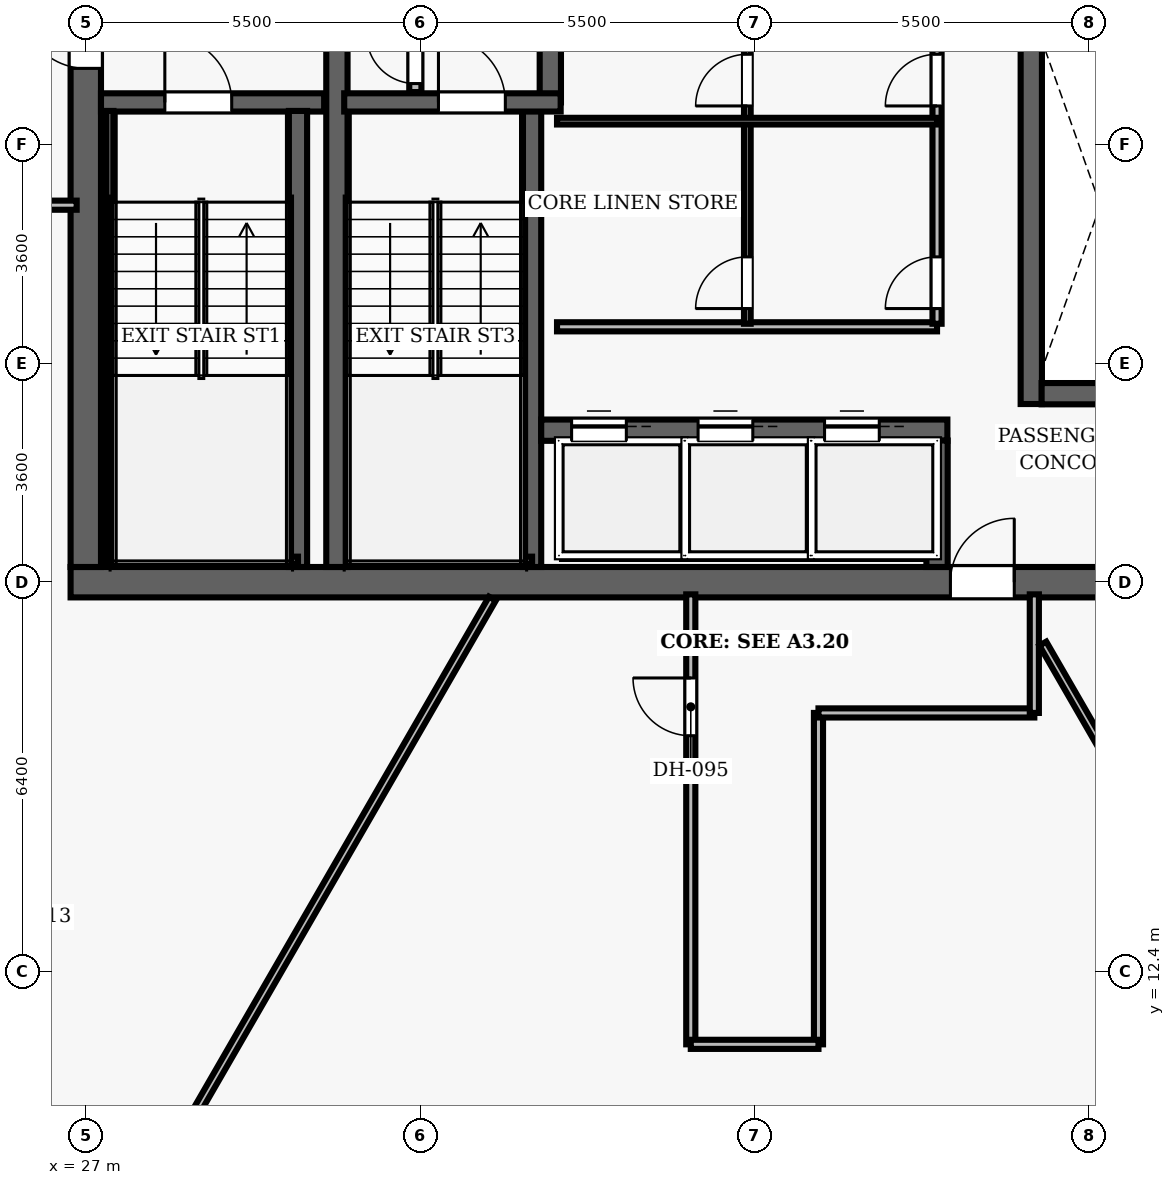
"""IFC4 building model, lengths in metres.
Left out: names, types, materials, properties, quantities, classifications, styles, units other than length and angle.
Written with IfcOpenShell. Run it as: python <this file> out.ifc"""

import sys

from ifc_helpers import new_model, si_unit, direction, frame, frame_2d, origin, place, context, subcontext, project, spatial, rectangle, extrude, element, fill, save


model = new_model("IFC4")
c1 = context("Model", 3, precision=1e-05, world=origin(), true_north=direction((0.0, 1.0)))
c2 = subcontext(c1, "Body", "Model", "MODEL_VIEW")
j1 = project(units=[si_unit("LENGTHUNIT", "METRE"), si_unit("PLANEANGLEUNIT", "RADIAN")], contexts=[c1])
p1 = place(None, origin())
s1 = spatial("IfcSite", under=j1, at=p1, CompositionType="ELEMENT")
p2 = place(p1, origin())
s2 = spatial("IfcBuilding", under=s1, at=p2, CompositionType="ELEMENT")
p3 = place(p2, frame((0.0, 0.0, 178.9)))
s3 = spatial("IfcBuildingStorey", under=s2, at=p3, CompositionType="ELEMENT", Elevation=178.9)
p4 = place(p3, frame((26.75, 18.8, 0.0), z_axis=(0.0, 0.0, 1.0), x_axis=(1.0, 0.0, 0.0)))
e1 = element("IfcWall", 1, at=p4, inside=s3, PredefinedType="SHEAR", context=c2, shape_type="SweptSolid", body=[
    extrude(rectangle(XDim=22.5, YDim=0.5, at=frame_2d((11.25, 0.0))), origin(), (0.0, 0.0, 1.0), 3.85),
])
p5 = place(p4, frame((14.47, 0.0, 0.0)))
e2 = element("IfcOpeningElement", 2, at=p5, cuts=e1, PredefinedType="OPENING", context=c2, shape_type="SweptSolid", body=[
    extrude(rectangle(XDim=1.05, YDim=2.15, at=frame_2d((0.525, 1.075))), frame((0.0, 0.26, 0.0), z_axis=(0.0, -1.0, 0.0), x_axis=(1.0, 0.0, 0.0)), (0.0, 0.0, 1.0), 0.52),
])
p6 = place(p3, frame((27.0, 19.05, 0.0), z_axis=(0.0, 0.0, 1.0), x_axis=(0.0, 1.0, 0.0)))
e3 = element("IfcWall", 3, at=p6, inside=s3, PredefinedType="SHEAR", context=c2, shape_type="SweptSolid", body=[
    extrude(rectangle(XDim=13.9, YDim=0.5, at=frame_2d((6.95, 0.0))), origin(), (0.0, 0.0, 1.0), 3.85),
])
p7 = place(p6, frame((8.2, 0.0, 0.0)))
e4 = element("IfcOpeningElement", 4, at=p7, cuts=e3, PredefinedType="OPENING", context=c2, shape_type="SweptSolid", body=[
    extrude(rectangle(XDim=1.05, YDim=2.15, at=frame_2d((0.525, 1.075))), frame((0.0, 0.26, 0.0), z_axis=(0.0, -1.0, 0.0), x_axis=(1.0, 0.0, 0.0)), (0.0, 0.0, 1.0), 0.52),
])
p8 = place(p3, frame((31.13, 19.05, 0.0), z_axis=(0.0, 0.0, 1.0), x_axis=(0.0, 1.0, 0.0)))
e5 = element("IfcWall", 5, at=p8, inside=s3, PredefinedType="SHEAR", context=c2, shape_type="SweptSolid", body=[
    extrude(rectangle(XDim=13.9, YDim=0.35, at=frame_2d((6.95, 0.0))), origin(), (0.0, 0.0, 1.0), 3.85),
])
p9 = place(p3, frame((27.25, 26.69, 0.0), z_axis=(0.0, 0.0, 1.0), x_axis=(1.0, 0.0, 0.0)))
e6 = element("IfcWall", 6, at=p9, inside=s3, PredefinedType="SHEAR", context=c2, shape_type="SweptSolid", body=[
    extrude(rectangle(XDim=3.67, YDim=0.3, at=frame_2d((1.835, 0.0))), origin(), (0.0, 0.0, 1.0), 3.85),
])
p10 = place(p9, frame((1.05, 0.0, 0.0)))
e7 = element("IfcOpeningElement", 7, at=p10, cuts=e6, PredefinedType="OPENING", context=c2, shape_type="SweptSolid", body=[
    extrude(rectangle(XDim=1.1, YDim=2.15, at=frame_2d((0.55, 1.075))), frame((0.0, 0.16, 0.0), z_axis=(0.0, -1.0, 0.0), x_axis=(1.0, 0.0, 0.0)), (0.0, 0.0, 1.0), 0.32),
])
p11 = place(p3, frame((30.49, 19.05, 0.0), z_axis=(0.0, 0.0, 1.0), x_axis=(0.0, 1.0, 0.0)))
e8 = element("IfcWall", 8, at=p11, inside=s3, PredefinedType="SHEAR", context=c2, shape_type="SweptSolid", body=[
    extrude(rectangle(XDim=7.5, YDim=0.3, at=frame_2d((3.75, 0.0))), origin(), (0.0, 0.0, 1.0), 3.85),
])
p12 = place(p3, frame((27.395, 19.1, 0.0), z_axis=(0.0, 0.0, 1.0), x_axis=(0.0, 1.0, 0.0)))
e9 = element("IfcWall", 9, at=p12, inside=s3, PredefinedType="SHEAR", context=c2, shape_type="SweptSolid", body=[
    extrude(rectangle(XDim=7.45, YDim=0.12, at=frame_2d((3.725, 0.0))), origin(), (0.0, 0.0, 1.0), 3.85),
])
p13 = place(p3, frame((27.395, 19.16, 0.0), z_axis=(0.0, 0.0, 1.0), x_axis=(1.0, 0.0, 0.0)))
e10 = element("IfcWall", 10, at=p13, inside=s3, PredefinedType="SHEAR", context=c2, shape_type="SweptSolid", body=[
    extrude(rectangle(XDim=3.095, YDim=0.12, at=frame_2d((1.547, 0.0))), origin(), (0.0, 0.0, 1.0), 3.85),
])
p14 = place(p3, frame((34.34, 19.05, 0.0), z_axis=(0.0, 0.0, 1.0), x_axis=(0.0, 1.0, 0.0)))
e11 = element("IfcWall", 11, at=p14, inside=s3, PredefinedType="SHEAR", context=c2, shape_type="SweptSolid", body=[
    extrude(rectangle(XDim=7.5, YDim=0.3, at=frame_2d((3.75, 0.0))), origin(), (0.0, 0.0, 1.0), 3.85),
])
p15 = place(p3, frame((34.64, 26.69, 0.0), z_axis=(0.0, 0.0, 1.0), x_axis=(0.0, 1.0, 0.0)))
e12 = element("IfcWall", 12, at=p15, inside=s3, PredefinedType="SHEAR", context=c2, shape_type="SweptSolid", body=[
    extrude(rectangle(XDim=6.26, YDim=0.35, at=frame_2d((3.13, 0.0))), origin(), (0.0, 0.0, 1.0), 3.85),
])
p16 = place(p3, frame((31.25, 26.69, 0.0), z_axis=(0.0, 0.0, 1.0), x_axis=(1.0, 0.0, 0.0)))
e13 = element("IfcWall", 13, at=p16, inside=s3, PredefinedType="SHEAR", context=c2, shape_type="SweptSolid", body=[
    extrude(rectangle(XDim=3.56, YDim=0.3, at=frame_2d((1.78, 0.0))), origin(), (0.0, 0.0, 1.0), 3.85),
])
p17 = place(p16, frame((1.55, 0.0, 0.0)))
e14 = element("IfcOpeningElement", 14, at=p17, cuts=e13, PredefinedType="OPENING", context=c2, shape_type="SweptSolid", body=[
    extrude(rectangle(XDim=1.1, YDim=2.15, at=frame_2d((0.55, 1.075))), frame((0.0, 0.16, 0.0), z_axis=(0.0, -1.0, 0.0), x_axis=(1.0, 0.0, 0.0)), (0.0, 0.0, 1.0), 0.32),
])
p18 = place(p3, frame((31.3, 19.16, 0.0), z_axis=(0.0, 0.0, 1.0), x_axis=(1.0, 0.0, 0.0)))
e15 = element("IfcWall", 15, at=p18, inside=s3, PredefinedType="SHEAR", context=c2, shape_type="SweptSolid", body=[
    extrude(rectangle(XDim=3.04, YDim=0.12, at=frame_2d((1.52, 0.0))), origin(), (0.0, 0.0, 1.0), 3.85),
])
p19 = place(p3, frame((32.42, 26.86, 0.0), z_axis=(0.0, 0.0, 1.0), x_axis=(0.0, 1.0, 0.0)))
e16 = element("IfcWall", 16, at=p19, inside=s3, PredefinedType="PARTITIONING", context=c2, shape_type="SweptSolid", body=[
    extrude(rectangle(XDim=2.04, YDim=0.2, at=frame_2d((1.02, 0.0))), origin(), (0.0, 0.0, 1.0), 3.035),
])
p20 = place(p19, frame((0.14, 0.0, 0.0)))
e17 = element("IfcOpeningElement", 17, at=p20, cuts=e16, PredefinedType="OPENING", context=c2, shape_type="SweptSolid", body=[
    extrude(rectangle(XDim=0.8, YDim=2.05, at=frame_2d((0.4, 1.025))), frame((0.0, 0.11, 0.0), z_axis=(0.0, -1.0, 0.0), x_axis=(1.0, 0.0, 0.0)), (0.0, 0.0, 1.0), 0.22),
])
p21 = place(p3, frame((42.55, 21.73, 0.0), z_axis=(0.0, 0.0, 1.0), x_axis=(0.0, 1.0, 0.0)))
e18 = element("IfcWall", 18, at=p21, inside=s3, PredefinedType="SHEAR", context=c2, shape_type="SweptSolid", body=[
    extrude(rectangle(XDim=6.54, YDim=0.35, at=frame_2d((3.27, 0.0))), origin(), (0.0, 0.0, 1.0), 3.035),
])
p22 = place(p3, frame((42.72, 21.9, 0.0), z_axis=(0.0, 0.0, 1.0), x_axis=(1.0, 0.0, 0.0)))
e19 = element("IfcWall", 19, at=p22, inside=s3, PredefinedType="SHEAR", context=c2, shape_type="SweptSolid", body=[
    extrude(rectangle(XDim=2.03, YDim=0.35, at=frame_2d((1.015, 0.0))), origin(), (0.0, 0.0, 1.0), 3.035),
])
p23 = place(p3, frame((34.49, 21.3, 0.0), z_axis=(0.0, 0.0, 1.0), x_axis=(1.0, 0.0, 0.0)))
e20 = element("IfcWall", 20, at=p23, inside=s3, PredefinedType="SHEAR", context=c2, shape_type="SweptSolid", body=[
    extrude(rectangle(XDim=6.68, YDim=0.35, at=frame_2d((3.34, 0.0))), origin(), (0.0, 0.0, 1.0), 3.035),
])
p24 = place(p23, frame((0.5, 0.0, 0.0)))
e21 = element("IfcOpeningElement", 21, at=p24, cuts=e20, PredefinedType="OPENING", context=c2, shape_type="SweptSolid", body=[
    extrude(rectangle(XDim=0.9, YDim=2.15, at=frame_2d((0.45, 1.075))), frame((0.0, 0.185, 0.0), z_axis=(0.0, -1.0, 0.0), x_axis=(1.0, 0.0, 0.0)), (0.0, 0.0, 1.0), 0.37),
])
p25 = place(p23, frame((2.58, 0.0, 0.0)))
e22 = element("IfcOpeningElement", 22, at=p25, cuts=e20, PredefinedType="OPENING", context=c2, shape_type="SweptSolid", body=[
    extrude(rectangle(XDim=0.9, YDim=2.15, at=frame_2d((0.45, 1.075))), frame((0.0, 0.185, 0.0), z_axis=(0.0, -1.0, 0.0), x_axis=(1.0, 0.0, 0.0)), (0.0, 0.0, 1.0), 0.37),
])
p26 = place(p23, frame((4.66, 0.0, 0.0)))
e23 = element("IfcOpeningElement", 23, at=p26, cuts=e20, PredefinedType="OPENING", context=c2, shape_type="SweptSolid", body=[
    extrude(rectangle(XDim=0.9, YDim=2.15, at=frame_2d((0.45, 1.075))), frame((0.0, 0.185, 0.0), z_axis=(0.0, -1.0, 0.0), x_axis=(1.0, 0.0, 0.0)), (0.0, 0.0, 1.0), 0.37),
])
p27 = place(p3, frame((41.0, 19.05, 0.0), z_axis=(0.0, 0.0, 1.0), x_axis=(0.0, 1.0, 0.0)))
e24 = element("IfcWall", 24, at=p27, inside=s3, PredefinedType="SHEAR", context=c2, shape_type="SweptSolid", body=[
    extrude(rectangle(XDim=2.08, YDim=0.35, at=frame_2d((1.04, 0.0))), origin(), (0.0, 0.0, 1.0), 3.035),
])
p28 = place(p3, frame((34.75, 23.0, 0.0), z_axis=(0.0, 0.0, 1.0), x_axis=(1.0, 0.0, 0.0)))
e25 = element("IfcWall", 25, at=p28, inside=s3, PredefinedType="PARTITIONING", context=c2, shape_type="SweptSolid", body=[
    extrude(rectangle(XDim=6.25, YDim=0.15, at=frame_2d((3.125, 0.0))), origin(), (0.0, 0.0, 1.0), 3.035),
])
p29 = place(p3, frame((41.0, 23.05, 0.0), z_axis=(0.0, 0.0, 1.0), x_axis=(0.0, 1.0, 0.0)))
e26 = element("IfcWall", 26, at=p29, inside=s3, PredefinedType="PARTITIONING", context=c2, shape_type="SweptSolid", body=[
    extrude(rectangle(XDim=9.8, YDim=0.15, at=frame_2d((4.9, 0.0))), origin(), (0.0, 0.0, 1.0), 3.035),
])
p30 = place(p29, frame((0.25, 0.0, 0.0)))
e27 = element("IfcOpeningElement", 27, at=p30, cuts=e26, PredefinedType="OPENING", context=c2, shape_type="SweptSolid", body=[
    extrude(rectangle(XDim=0.85, YDim=2.1, at=frame_2d((0.425, 1.05))), frame((0.0, 0.085, 0.0), z_axis=(0.0, -1.0, 0.0), x_axis=(1.0, 0.0, 0.0)), (0.0, 0.0, 1.0), 0.17),
])
p31 = place(p29, frame((3.582, 0.0, 0.0)))
e28 = element("IfcOpeningElement", 28, at=p31, cuts=e26, PredefinedType="OPENING", context=c2, shape_type="SweptSolid", body=[
    extrude(rectangle(XDim=0.85, YDim=2.1, at=frame_2d((0.425, 1.05))), frame((0.0, 0.085, 0.0), z_axis=(0.0, -1.0, 0.0), x_axis=(1.0, 0.0, 0.0)), (0.0, 0.0, 1.0), 0.17),
])
p32 = place(p29, frame((6.816, 0.0, 0.0)))
e29 = element("IfcOpeningElement", 29, at=p32, cuts=e26, PredefinedType="OPENING", context=c2, shape_type="SweptSolid", body=[
    extrude(rectangle(XDim=0.85, YDim=2.1, at=frame_2d((0.425, 1.05))), frame((0.0, 0.085, 0.0), z_axis=(0.0, -1.0, 0.0), x_axis=(1.0, 0.0, 0.0)), (0.0, 0.0, 1.0), 0.17),
])
p33 = place(p3, frame((37.88, 23.05, 0.0), z_axis=(0.0, 0.0, 1.0), x_axis=(0.0, 1.0, 0.0)))
e30 = element("IfcWall", 30, at=p33, inside=s3, PredefinedType="PARTITIONING", context=c2, shape_type="SweptSolid", body=[
    extrude(rectangle(XDim=9.8, YDim=0.11, at=frame_2d((4.9, 0.0))), origin(), (0.0, 0.0, 1.0), 3.035),
])
p34 = place(p33, frame((0.25, 0.0, 0.0)))
e31 = element("IfcOpeningElement", 31, at=p34, cuts=e30, PredefinedType="OPENING", context=c2, shape_type="SweptSolid", body=[
    extrude(rectangle(XDim=0.85, YDim=2.1, at=frame_2d((0.425, 1.05))), frame((0.0, 0.065, 0.0), z_axis=(0.0, -1.0, 0.0), x_axis=(1.0, 0.0, 0.0)), (0.0, 0.0, 1.0), 0.13),
])
p35 = place(p33, frame((3.582, 0.0, 0.0)))
e32 = element("IfcOpeningElement", 32, at=p35, cuts=e30, PredefinedType="OPENING", context=c2, shape_type="SweptSolid", body=[
    extrude(rectangle(XDim=0.85, YDim=2.1, at=frame_2d((0.425, 1.05))), frame((0.0, 0.065, 0.0), z_axis=(0.0, -1.0, 0.0), x_axis=(1.0, 0.0, 0.0)), (0.0, 0.0, 1.0), 0.13),
])
p36 = place(p33, frame((6.816, 0.0, 0.0)))
e33 = element("IfcOpeningElement", 33, at=p36, cuts=e30, PredefinedType="OPENING", context=c2, shape_type="SweptSolid", body=[
    extrude(rectangle(XDim=0.85, YDim=2.1, at=frame_2d((0.425, 1.05))), frame((0.0, 0.065, 0.0), z_axis=(0.0, -1.0, 0.0), x_axis=(1.0, 0.0, 0.0)), (0.0, 0.0, 1.0), 0.13),
])
p37 = place(p3, frame((34.75, 26.382, 0.0), z_axis=(0.0, 0.0, 1.0), x_axis=(1.0, 0.0, 0.0)))
e34 = element("IfcWall", 34, at=p37, inside=s3, PredefinedType="PARTITIONING", context=c2, shape_type="SweptSolid", body=[
    extrude(rectangle(XDim=6.25, YDim=0.11, at=frame_2d((3.125, 0.0))), origin(), (0.0, 0.0, 1.0), 3.035),
])
p38 = place(p3, frame((17.291, 25.0, 0.0), z_axis=(0.0, 0.0, 1.0), x_axis=(1.0, 0.0, 0.0)))
e35 = element("IfcWall", 35, at=p38, inside=s3, PredefinedType="PARTITIONING", context=c2, shape_type="SweptSolid", body=[
    extrude(rectangle(XDim=9.559, YDim=0.15, at=frame_2d((4.78, 0.0))), origin(), (0.0, 0.0, 1.0), 3.035),
])
p39 = place(p38, frame((6.419, 0.0, 0.0)))
e36 = element("IfcOpeningElement", 36, at=p39, cuts=e35, PredefinedType="OPENING", context=c2, shape_type="SweptSolid", body=[
    extrude(rectangle(XDim=1.5, YDim=2.2, at=frame_2d((0.75, 1.1))), frame((0.0, 0.085, 0.0), z_axis=(0.0, -1.0, 0.0), x_axis=(1.0, 0.0, 0.0)), (0.0, 0.0, 1.0), 0.17),
])
p40 = place(p3, frame((36.95, 11.2, 0.0), z_axis=(0.0, 0.0, 1.0), x_axis=(0.0, 1.0, 0.0)))
e37 = element("IfcWall", 37, at=p40, inside=s3, PredefinedType="PARTITIONING", context=c2, shape_type="SweptSolid", body=[
    extrude(rectangle(XDim=7.4, YDim=0.15, at=frame_2d((3.7, 0.0))), origin(), (0.0, 0.0, 1.0), 3.035),
])
p41 = place(p40, frame((5.075, 0.0, 0.0)))
e38 = element("IfcOpeningElement", 38, at=p41, cuts=e37, PredefinedType="OPENING", context=c2, shape_type="SweptSolid", body=[
    extrude(rectangle(XDim=0.95, YDim=2.15, at=frame_2d((0.475, 1.075))), frame((0.0, 0.085, 0.0), z_axis=(0.0, -1.0, 0.0), x_axis=(1.0, 0.0, 0.0)), (0.0, 0.0, 1.0), 0.17),
])
p42 = place(p3, frame((39.05, 11.2, 0.0), z_axis=(0.0, 0.0, 1.0), x_axis=(0.0, 1.0, 0.0)))
e39 = element("IfcWall", 39, at=p42, inside=s3, PredefinedType="PARTITIONING", context=c2, shape_type="SweptSolid", body=[
    extrude(rectangle(XDim=5.45, YDim=0.15, at=frame_2d((2.725, 0.0))), origin(), (0.0, 0.0, 1.0), 3.035),
])
p43 = place(p3, frame((39.05, 16.65, 0.0), z_axis=(0.0, 0.0, 1.0), x_axis=(1.0, 0.0, 0.0)))
e40 = element("IfcWall", 40, at=p43, inside=s3, PredefinedType="PARTITIONING", context=c2, shape_type="SweptSolid", body=[
    extrude(rectangle(XDim=3.55, YDim=0.15, at=frame_2d((1.775, 0.0))), origin(), (0.0, 0.0, 1.0), 3.035),
])
p44 = place(p3, frame((42.6, 16.65, 0.0), z_axis=(0.0, 0.0, 1.0), x_axis=(0.0, 1.0, 0.0)))
e41 = element("IfcWall", 41, at=p44, inside=s3, PredefinedType="PARTITIONING", context=c2, shape_type="SweptSolid", body=[
    extrude(rectangle(XDim=1.95, YDim=0.15, at=frame_2d((0.975, 0.0))), origin(), (0.0, 0.0, 1.0), 3.035),
])
p45 = place(p3, frame((36.95, 11.2, 0.0), z_axis=(0.0, 0.0, 1.0), x_axis=(1.0, 0.0, 0.0)))
e42 = element("IfcWall", 42, at=p45, inside=s3, PredefinedType="PARTITIONING", context=c2, shape_type="SweptSolid", body=[
    extrude(rectangle(XDim=2.1, YDim=0.15, at=frame_2d((1.05, 0.0))), origin(), (0.0, 0.0, 1.0), 3.035),
])
p46 = place(p3, frame((33.687, 18.53, 0.0), z_axis=(0.0, 0.0, 1.0), x_axis=(-0.499996112969, -0.866027647951, 0.0)))
e43 = element("IfcWall", 43, at=p46, inside=s3, PredefinedType="PARTITIONING", context=c2, shape_type="SweptSolid", body=[
    extrude(rectangle(XDim=13.18, YDim=0.13, at=frame_2d((6.59, 0.0))), origin(), (0.0, 0.0, 1.0), 3.035),
])
p47 = place(p3, frame((42.74, 17.79, 0.0), z_axis=(0.0, 0.0, 1.0), x_axis=(0.500003906344, -0.866023148444, 0.0)))
e44 = element("IfcWall", 44, at=p47, inside=s3, PredefinedType="PARTITIONING", context=c2, shape_type="SweptSolid", body=[
    extrude(rectangle(XDim=16.869, YDim=0.13, at=frame_2d((8.435, 0.0))), origin(), (0.0, 0.0, 1.0), 3.035),
])
p48 = place(p10, origin())
e45 = element("IfcDoor", 45, at=p48, inside=s3, OperationType="SINGLE_SWING_LEFT", PredefinedType="DOOR", context=c2, shape_type="SweptSolid", body=[
    extrude(rectangle(XDim=1.1, YDim=2.15, at=frame_2d((0.55, 1.075))), frame((0.0, 0.025, 0.0), z_axis=(0.0, -1.0, 0.0), x_axis=(1.0, 0.0, 0.0)), (0.0, 0.0, 1.0), 0.05),
])
fill(e7, e45)
p49 = place(p7, origin())
e46 = element("IfcDoor", 46, at=p49, inside=s3, OperationType="SINGLE_SWING_RIGHT", PredefinedType="DOOR", context=c2, shape_type="SweptSolid", body=[
    extrude(rectangle(XDim=1.05, YDim=2.15, at=frame_2d((0.525, 1.075))), frame((0.0, 0.025, 0.0), z_axis=(0.0, -1.0, 0.0), x_axis=(1.0, 0.0, 0.0)), (0.0, 0.0, 1.0), 0.05),
])
fill(e4, e46)
p50 = place(p17, origin())
e47 = element("IfcDoor", 47, at=p50, inside=s3, OperationType="SINGLE_SWING_LEFT", PredefinedType="DOOR", context=c2, shape_type="SweptSolid", body=[
    extrude(rectangle(XDim=1.1, YDim=2.15, at=frame_2d((0.55, 1.075))), frame((0.0, 0.025, 0.0), z_axis=(0.0, -1.0, 0.0), x_axis=(1.0, 0.0, 0.0)), (0.0, 0.0, 1.0), 0.05),
])
fill(e14, e47)
p51 = place(p20, origin())
e48 = element("IfcDoor", 48, at=p51, inside=s3, OperationType="SINGLE_SWING_RIGHT", PredefinedType="DOOR", context=c2, shape_type="SweptSolid", body=[
    extrude(rectangle(XDim=0.8, YDim=2.05, at=frame_2d((0.4, 1.025))), frame((0.0, 0.025, 0.0), z_axis=(0.0, -1.0, 0.0), x_axis=(1.0, 0.0, 0.0)), (0.0, 0.0, 1.0), 0.05),
])
fill(e17, e48)
p52 = place(p5, origin())
e49 = element("IfcDoor", 49, at=p52, inside=s3, OperationType="SINGLE_SWING_RIGHT", PredefinedType="DOOR", context=c2, shape_type="SweptSolid", body=[
    extrude(rectangle(XDim=1.05, YDim=2.15, at=frame_2d((0.525, 1.075))), frame((0.0, 0.025, 0.0), z_axis=(0.0, -1.0, 0.0), x_axis=(1.0, 0.0, 0.0)), (0.0, 0.0, 1.0), 0.05),
])
fill(e2, e49)
p53 = place(p30, origin())
e50 = element("IfcDoor", 50, at=p53, inside=s3, OperationType="SINGLE_SWING_LEFT", PredefinedType="DOOR", context=c2, shape_type="SweptSolid", body=[
    extrude(rectangle(XDim=0.85, YDim=2.1, at=frame_2d((0.425, 1.05))), frame((0.0, 0.025, 0.0), z_axis=(0.0, -1.0, 0.0), x_axis=(1.0, 0.0, 0.0)), (0.0, 0.0, 1.0), 0.05),
])
fill(e27, e50)
p54 = place(p34, origin())
e51 = element("IfcDoor", 51, at=p54, inside=s3, OperationType="SINGLE_SWING_LEFT", PredefinedType="DOOR", context=c2, shape_type="SweptSolid", body=[
    extrude(rectangle(XDim=0.85, YDim=2.1, at=frame_2d((0.425, 1.05))), frame((0.0, 0.025, 0.0), z_axis=(0.0, -1.0, 0.0), x_axis=(1.0, 0.0, 0.0)), (0.0, 0.0, 1.0), 0.05),
])
fill(e31, e51)
p55 = place(p31, origin())
e52 = element("IfcDoor", 52, at=p55, inside=s3, OperationType="SINGLE_SWING_LEFT", PredefinedType="DOOR", context=c2, shape_type="SweptSolid", body=[
    extrude(rectangle(XDim=0.85, YDim=2.1, at=frame_2d((0.425, 1.05))), frame((0.0, 0.025, 0.0), z_axis=(0.0, -1.0, 0.0), x_axis=(1.0, 0.0, 0.0)), (0.0, 0.0, 1.0), 0.05),
])
fill(e28, e52)
p56 = place(p35, origin())
e53 = element("IfcDoor", 53, at=p56, inside=s3, OperationType="SINGLE_SWING_LEFT", PredefinedType="DOOR", context=c2, shape_type="SweptSolid", body=[
    extrude(rectangle(XDim=0.85, YDim=2.1, at=frame_2d((0.425, 1.05))), frame((0.0, 0.025, 0.0), z_axis=(0.0, -1.0, 0.0), x_axis=(1.0, 0.0, 0.0)), (0.0, 0.0, 1.0), 0.05),
])
fill(e32, e53)
p57 = place(p41, origin())
e54 = element("IfcDoor", 54, at=p57, inside=s3, OperationType="SINGLE_SWING_RIGHT", PredefinedType="DOOR", context=c2, shape_type="SweptSolid", body=[
    extrude(rectangle(XDim=0.95, YDim=2.15, at=frame_2d((0.475, 1.075))), frame((0.0, 0.025, 0.0), z_axis=(0.0, -1.0, 0.0), x_axis=(1.0, 0.0, 0.0)), (0.0, 0.0, 1.0), 0.05),
])
fill(e38, e54)
p58 = place(p24, origin())
e55 = element("IfcDoor", 55, at=p58, inside=s3, OperationType="SLIDING_TO_LEFT", PredefinedType="DOOR", context=c2, shape_type="SweptSolid", body=[
    extrude(rectangle(XDim=0.9, YDim=2.15, at=frame_2d((0.45, 1.075))), frame((0.0, 0.025, 0.0), z_axis=(0.0, -1.0, 0.0), x_axis=(1.0, 0.0, 0.0)), (0.0, 0.0, 1.0), 0.05),
])
fill(e21, e55)
p59 = place(p25, origin())
e56 = element("IfcDoor", 56, at=p59, inside=s3, OperationType="SLIDING_TO_LEFT", PredefinedType="DOOR", context=c2, shape_type="SweptSolid", body=[
    extrude(rectangle(XDim=0.9, YDim=2.15, at=frame_2d((0.45, 1.075))), frame((0.0, 0.025, 0.0), z_axis=(0.0, -1.0, 0.0), x_axis=(1.0, 0.0, 0.0)), (0.0, 0.0, 1.0), 0.05),
])
fill(e22, e56)
p60 = place(p26, origin())
e57 = element("IfcDoor", 57, at=p60, inside=s3, OperationType="SLIDING_TO_LEFT", PredefinedType="DOOR", context=c2, shape_type="SweptSolid", body=[
    extrude(rectangle(XDim=0.9, YDim=2.15, at=frame_2d((0.45, 1.075))), frame((0.0, 0.025, 0.0), z_axis=(0.0, -1.0, 0.0), x_axis=(1.0, 0.0, 0.0)), (0.0, 0.0, 1.0), 0.05),
])
fill(e23, e57)
save(model, sys.argv[1])
